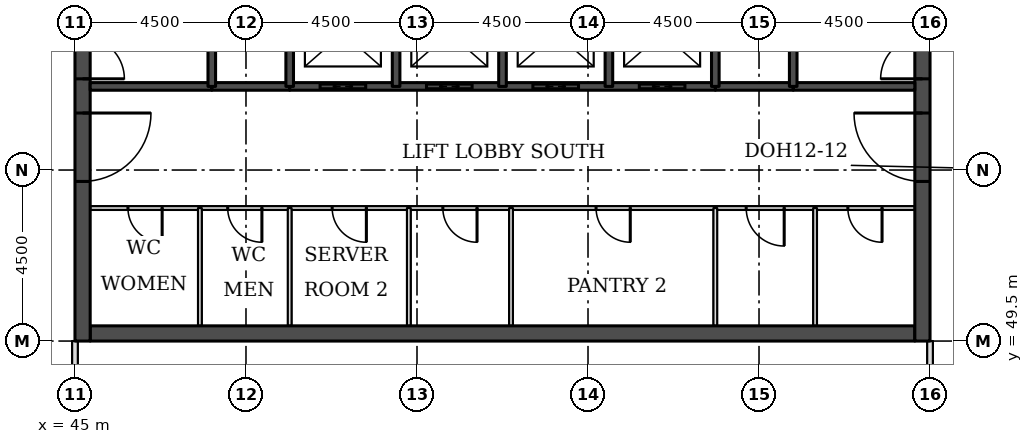
"""IFC4 building model, lengths in metres.
Left out: names, types, materials, properties, quantities, classifications, styles, units other than length and angle.
Written with IfcOpenShell. Run it as: python <this file> out.ifc"""

import sys

from ifc_helpers import new_model, si_unit, direction, frame, frame_2d, origin, place, context, subcontext, project, spatial, rectangle, extrude, element, fill, save


model = new_model("IFC4")
c1 = context("Model", 3, precision=1e-05, world=origin(), true_north=direction((0.0, 1.0)))
c2 = subcontext(c1, "Body", "Model", "MODEL_VIEW")
j1 = project(units=[si_unit("LENGTHUNIT", "METRE"), si_unit("PLANEANGLEUNIT", "RADIAN")], contexts=[c1])
p1 = place(None, origin())
s1 = spatial("IfcSite", under=j1, at=p1, CompositionType="ELEMENT")
p2 = place(p1, origin())
s2 = spatial("IfcBuilding", under=s1, at=p2, CompositionType="ELEMENT")
p3 = place(p2, frame((0.0, 0.0, 252.6)))
s3 = spatial("IfcBuildingStorey", under=s2, at=p3, CompositionType="ELEMENT", Elevation=252.6)
p4 = place(p3, frame((45.4, 49.7, 0.0), z_axis=(0.0, 0.0, 1.0), x_axis=(1.0, 0.0, 0.0)))
e1 = element("IfcWall", 1, at=p4, inside=s3, PredefinedType="SHEAR", context=c2, shape_type="SweptSolid", body=[
    extrude(rectangle(XDim=21.7, YDim=0.4, at=frame_2d((10.85, 0.0))), origin(), (0.0, 0.0, 1.0), 3.7),
])
p5 = place(p3, frame((45.2, 49.5, 0.0), z_axis=(0.0, 0.0, 1.0), x_axis=(0.0, 1.0, 0.0)))
e2 = element("IfcWall", 2, at=p5, inside=s3, PredefinedType="SHEAR", context=c2, shape_type="SweptSolid", body=[
    extrude(rectangle(XDim=22.5, YDim=0.4, at=frame_2d((11.25, 0.0))), origin(), (0.0, 0.0, 1.0), 3.7),
])
p6 = place(p5, frame((4.2, 0.0, 0.0)))
e3 = element("IfcOpeningElement", 3, at=p6, cuts=e2, PredefinedType="OPENING", context=c2, shape_type="SweptSolid", body=[
    extrude(rectangle(XDim=1.8, YDim=2.1, at=frame_2d((0.9, 1.05))), frame((0.0, 0.21, 0.0), z_axis=(0.0, -1.0, 0.0), x_axis=(1.0, 0.0, 0.0)), (0.0, 0.0, 1.0), 0.42),
])
p7 = place(p5, frame((6.9, 0.0, 0.0)))
e4 = element("IfcOpeningElement", 4, at=p7, cuts=e2, PredefinedType="OPENING", context=c2, shape_type="SweptSolid", body=[
    extrude(rectangle(XDim=1.1, YDim=2.1, at=frame_2d((0.55, 1.05))), frame((0.0, 0.21, 0.0), z_axis=(0.0, -1.0, 0.0), x_axis=(1.0, 0.0, 0.0)), (0.0, 0.0, 1.0), 0.42),
])
p8 = place(p5, frame((13.6, 0.0, 0.0)))
e5 = element("IfcOpeningElement", 5, at=p8, cuts=e2, PredefinedType="OPENING", context=c2, shape_type="SweptSolid", body=[
    extrude(rectangle(XDim=1.1, YDim=2.1, at=frame_2d((0.55, 1.05))), frame((0.0, 0.21, 0.0), z_axis=(0.0, -1.0, 0.0), x_axis=(1.0, 0.0, 0.0)), (0.0, 0.0, 1.0), 0.42),
])
p9 = place(p5, frame((16.5, 0.0, 0.0)))
e6 = element("IfcOpeningElement", 6, at=p9, cuts=e2, PredefinedType="OPENING", context=c2, shape_type="SweptSolid", body=[
    extrude(rectangle(XDim=1.8, YDim=2.1, at=frame_2d((0.9, 1.05))), frame((0.0, 0.21, 0.0), z_axis=(0.0, -1.0, 0.0), x_axis=(1.0, 0.0, 0.0)), (0.0, 0.0, 1.0), 0.42),
])
p10 = place(p3, frame((67.3, 49.5, 0.0), z_axis=(0.0, 0.0, 1.0), x_axis=(0.0, 1.0, 0.0)))
e7 = element("IfcWall", 7, at=p10, inside=s3, PredefinedType="SHEAR", context=c2, shape_type="SweptSolid", body=[
    extrude(rectangle(XDim=22.5, YDim=0.4, at=frame_2d((11.25, 0.0))), origin(), (0.0, 0.0, 1.0), 3.7),
])
p11 = place(p10, frame((4.2, 0.0, 0.0)))
e8 = element("IfcOpeningElement", 8, at=p11, cuts=e7, PredefinedType="OPENING", context=c2, shape_type="SweptSolid", body=[
    extrude(rectangle(XDim=1.8, YDim=2.1, at=frame_2d((0.9, 1.05))), frame((0.0, 0.21, 0.0), z_axis=(0.0, -1.0, 0.0), x_axis=(1.0, 0.0, 0.0)), (0.0, 0.0, 1.0), 0.42),
])
p12 = place(p10, frame((6.9, 0.0, 0.0)))
e9 = element("IfcOpeningElement", 9, at=p12, cuts=e7, PredefinedType="OPENING", context=c2, shape_type="SweptSolid", body=[
    extrude(rectangle(XDim=1.1, YDim=2.1, at=frame_2d((0.55, 1.05))), frame((0.0, 0.21, 0.0), z_axis=(0.0, -1.0, 0.0), x_axis=(1.0, 0.0, 0.0)), (0.0, 0.0, 1.0), 0.42),
])
p13 = place(p10, frame((13.6, 0.0, 0.0)))
e10 = element("IfcOpeningElement", 10, at=p13, cuts=e7, PredefinedType="OPENING", context=c2, shape_type="SweptSolid", body=[
    extrude(rectangle(XDim=1.1, YDim=2.1, at=frame_2d((0.55, 1.05))), frame((0.0, 0.21, 0.0), z_axis=(0.0, -1.0, 0.0), x_axis=(1.0, 0.0, 0.0)), (0.0, 0.0, 1.0), 0.42),
])
p14 = place(p10, frame((16.5, 0.0, 0.0)))
e11 = element("IfcOpeningElement", 11, at=p14, cuts=e7, PredefinedType="OPENING", context=c2, shape_type="SweptSolid", body=[
    extrude(rectangle(XDim=1.8, YDim=2.1, at=frame_2d((0.9, 1.05))), frame((0.0, 0.21, 0.0), z_axis=(0.0, -1.0, 0.0), x_axis=(1.0, 0.0, 0.0)), (0.0, 0.0, 1.0), 0.42),
])
p15 = place(p3, frame((67.5, 40.05, 0.0), z_axis=(0.0, 0.0, 1.0), x_axis=(0.0, 1.0, 0.0)))
e12 = element("IfcWall", 12, at=p15, inside=s3, PredefinedType="PARTITIONING", context=c2, shape_type="SweptSolid", body=[
    extrude(rectangle(XDim=9.45, YDim=0.15, at=frame_2d((4.725, 0.0))), origin(), (0.0, 0.0, 1.0), 3.022),
])
p16 = place(p3, frame((45.0, 48.0, 0.0), z_axis=(0.0, 0.0, 1.0), x_axis=(0.0, 1.0, 0.0)))
e13 = element("IfcWall", 13, at=p16, inside=s3, PredefinedType="PARTITIONING", context=c2, shape_type="SweptSolid", body=[
    extrude(rectangle(XDim=1.5, YDim=0.15, at=frame_2d((0.75, 0.0))), origin(), (0.0, 0.0, 1.0), 3.022),
])
p17 = place(p3, frame((45.4, 53.0, 0.0), z_axis=(0.0, 0.0, 1.0), x_axis=(1.0, 0.0, 0.0)))
e14 = element("IfcWall", 14, at=p17, inside=s3, PredefinedType="PARTITIONING", context=c2, shape_type="SweptSolid", body=[
    extrude(rectangle(XDim=21.7, YDim=0.1, at=frame_2d((10.85, 0.0))), origin(), (0.0, 0.0, 1.0), 3.55),
])
p18 = place(p17, frame((19.938, 0.0, 0.0)))
e15 = element("IfcOpeningElement", 15, at=p18, cuts=e14, PredefinedType="OPENING", context=c2, shape_type="SweptSolid", body=[
    extrude(rectangle(XDim=0.9, YDim=2.1, at=frame_2d((0.45, 1.05))), frame((0.0, 0.06, 0.0), z_axis=(0.0, -1.0, 0.0), x_axis=(1.0, 0.0, 0.0)), (0.0, 0.0, 1.0), 0.12),
])
p19 = place(p17, frame((17.262, 0.0, 0.0)))
e16 = element("IfcOpeningElement", 16, at=p19, cuts=e14, PredefinedType="OPENING", context=c2, shape_type="SweptSolid", body=[
    extrude(rectangle(XDim=1.0, YDim=2.1, at=frame_2d((0.5, 1.05))), frame((0.0, 0.06, 0.0), z_axis=(0.0, -1.0, 0.0), x_axis=(1.0, 0.0, 0.0)), (0.0, 0.0, 1.0), 0.12),
])
p20 = place(p17, frame((0.994, 0.0, 0.0)))
e17 = element("IfcOpeningElement", 17, at=p20, cuts=e14, PredefinedType="OPENING", context=c2, shape_type="SweptSolid", body=[
    extrude(rectangle(XDim=0.9, YDim=2.1, at=frame_2d((0.45, 1.05))), frame((0.0, 0.06, 0.0), z_axis=(0.0, -1.0, 0.0), x_axis=(1.0, 0.0, 0.0)), (0.0, 0.0, 1.0), 0.12),
])
p21 = place(p17, frame((3.619, 0.0, 0.0)))
e18 = element("IfcOpeningElement", 18, at=p21, cuts=e14, PredefinedType="OPENING", context=c2, shape_type="SweptSolid", body=[
    extrude(rectangle(XDim=0.9, YDim=2.1, at=frame_2d((0.45, 1.05))), frame((0.0, 0.06, 0.0), z_axis=(0.0, -1.0, 0.0), x_axis=(1.0, 0.0, 0.0)), (0.0, 0.0, 1.0), 0.12),
])
p22 = place(p17, frame((6.368, 0.0, 0.0)))
e19 = element("IfcOpeningElement", 19, at=p22, cuts=e14, PredefinedType="OPENING", context=c2, shape_type="SweptSolid", body=[
    extrude(rectangle(XDim=0.9, YDim=2.1, at=frame_2d((0.45, 1.05))), frame((0.0, 0.06, 0.0), z_axis=(0.0, -1.0, 0.0), x_axis=(1.0, 0.0, 0.0)), (0.0, 0.0, 1.0), 0.12),
])
p23 = place(p17, frame((9.28, 0.0, 0.0)))
e20 = element("IfcOpeningElement", 20, at=p23, cuts=e14, PredefinedType="OPENING", context=c2, shape_type="SweptSolid", body=[
    extrude(rectangle(XDim=0.9, YDim=2.1, at=frame_2d((0.45, 1.05))), frame((0.0, 0.06, 0.0), z_axis=(0.0, -1.0, 0.0), x_axis=(1.0, 0.0, 0.0)), (0.0, 0.0, 1.0), 0.12),
])
p24 = place(p17, frame((13.312, 0.0, 0.0)))
e21 = element("IfcOpeningElement", 21, at=p24, cuts=e14, PredefinedType="OPENING", context=c2, shape_type="SweptSolid", body=[
    extrude(rectangle(XDim=0.9, YDim=2.1, at=frame_2d((0.45, 1.05))), frame((0.0, 0.06, 0.0), z_axis=(0.0, -1.0, 0.0), x_axis=(1.0, 0.0, 0.0)), (0.0, 0.0, 1.0), 0.12),
])
for number, where, z_axis, x_axis in (
    (22, (48.6, 56.2, 0.0), (0.0, 0.0, 1.0), (1.0, 0.0, 0.0)),
    (23, (61.85, 56.2, 0.0), (0.0, 0.0, 1.0), (1.0, 0.0, 0.0)),
):
    element("IfcWall", number, at=place(p3, frame(where, z_axis=z_axis, x_axis=x_axis)), inside=s3, PredefinedType="SOLIDWALL", context=c2, shape_type="SweptSolid", body=[
        extrude(rectangle(XDim=2.05, YDim=0.2, at=frame_2d((1.025, 0.0))), origin(), (0.0, 0.0, 1.0), 3.55),
    ])
p25 = place(p3, frame((45.4, 56.2, 0.0), z_axis=(0.0, 0.0, 1.0), x_axis=(1.0, 0.0, 0.0)))
e24 = element("IfcWall", 24, at=p25, inside=s3, PredefinedType="SOLIDWALL", context=c2, shape_type="SweptSolid", body=[
    extrude(rectangle(XDim=3.2, YDim=0.2, at=frame_2d((1.6, 0.0))), origin(), (0.0, 0.0, 1.0), 3.55),
])
p26 = place(p3, frame((50.65, 56.2, 0.0), z_axis=(0.0, 0.0, 1.0), x_axis=(1.0, 0.0, 0.0)))
e25 = element("IfcWall", 25, at=p26, inside=s3, PredefinedType="SOLIDWALL", context=c2, shape_type="SweptSolid", body=[
    extrude(rectangle(XDim=11.2, YDim=0.2, at=frame_2d((5.6, 0.0))), origin(), (0.0, 0.0, 1.0), 3.55),
])
p27 = place(p26, frame((0.8, 0.0, 0.0)))
e26 = element("IfcOpeningElement", 26, at=p27, cuts=e25, PredefinedType="OPENING", context=c2, shape_type="SweptSolid", body=[
    extrude(rectangle(XDim=1.2, YDim=2.1, at=frame_2d((0.6, 1.05))), frame((0.0, 0.11, 0.0), z_axis=(0.0, -1.0, 0.0), x_axis=(1.0, 0.0, 0.0)), (0.0, 0.0, 1.0), 0.22),
])
p28 = place(p26, frame((3.6, 0.0, 0.0)))
e27 = element("IfcOpeningElement", 27, at=p28, cuts=e25, PredefinedType="OPENING", context=c2, shape_type="SweptSolid", body=[
    extrude(rectangle(XDim=1.2, YDim=2.1, at=frame_2d((0.6, 1.05))), frame((0.0, 0.11, 0.0), z_axis=(0.0, -1.0, 0.0), x_axis=(1.0, 0.0, 0.0)), (0.0, 0.0, 1.0), 0.22),
])
p29 = place(p26, frame((6.4, 0.0, 0.0)))
e28 = element("IfcOpeningElement", 28, at=p29, cuts=e25, PredefinedType="OPENING", context=c2, shape_type="SweptSolid", body=[
    extrude(rectangle(XDim=1.2, YDim=2.1, at=frame_2d((0.6, 1.05))), frame((0.0, 0.11, 0.0), z_axis=(0.0, -1.0, 0.0), x_axis=(1.0, 0.0, 0.0)), (0.0, 0.0, 1.0), 0.22),
])
p30 = place(p26, frame((9.2, 0.0, 0.0)))
e29 = element("IfcOpeningElement", 29, at=p30, cuts=e25, PredefinedType="OPENING", context=c2, shape_type="SweptSolid", body=[
    extrude(rectangle(XDim=1.2, YDim=2.1, at=frame_2d((0.6, 1.05))), frame((0.0, 0.11, 0.0), z_axis=(0.0, -1.0, 0.0), x_axis=(1.0, 0.0, 0.0)), (0.0, 0.0, 1.0), 0.22),
])
p31 = place(p3, frame((63.9, 56.2, 0.0), z_axis=(0.0, 0.0, 1.0), x_axis=(1.0, 0.0, 0.0)))
e30 = element("IfcWall", 30, at=p31, inside=s3, PredefinedType="SOLIDWALL", context=c2, shape_type="SweptSolid", body=[
    extrude(rectangle(XDim=3.2, YDim=0.2, at=frame_2d((1.6, 0.0))), origin(), (0.0, 0.0, 1.0), 3.55),
])
p32 = place(p3, frame((48.288, 49.9, 0.0), z_axis=(0.0, 0.0, 1.0), x_axis=(0.0, 1.0, 0.0)))
e31 = element("IfcWall", 31, at=p32, inside=s3, PredefinedType="PARTITIONING", context=c2, shape_type="SweptSolid", body=[
    extrude(rectangle(XDim=3.1, YDim=0.1, at=frame_2d((1.55, 0.0))), origin(), (0.0, 0.0, 1.0), 3.55),
])
p33 = place(p3, frame((48.6, 56.2, 0.0), z_axis=(0.0, 0.0, 1.0), x_axis=(0.0, 1.0, 0.0)))
e32 = element("IfcWall", 32, at=p33, inside=s3, PredefinedType="SOLIDWALL", context=c2, shape_type="SweptSolid", body=[
    extrude(rectangle(XDim=5.8, YDim=0.2, at=frame_2d((2.9, 0.0))), origin(), (0.0, 0.0, 1.0), 3.55),
])
p34 = place(p3, frame((50.65, 49.9, 0.0), z_axis=(0.0, 0.0, 1.0), x_axis=(0.0, 1.0, 0.0)))
e33 = element("IfcWall", 33, at=p34, inside=s3, PredefinedType="PARTITIONING", context=c2, shape_type="SweptSolid", body=[
    extrude(rectangle(XDim=3.1, YDim=0.1, at=frame_2d((1.55, 0.0))), origin(), (0.0, 0.0, 1.0), 3.55),
])
for number, where, z_axis, x_axis in (
    (34, (50.65, 56.2, 0.0), (0.0, 0.0, 1.0), (0.0, 1.0, 0.0)),
    (35, (53.45, 56.2, 0.0), (0.0, 0.0, 1.0), (0.0, 1.0, 0.0)),
):
    element("IfcWall", number, at=place(p3, frame(where, z_axis=z_axis, x_axis=x_axis)), inside=s3, PredefinedType="SOLIDWALL", context=c2, shape_type="SweptSolid", body=[
        extrude(rectangle(XDim=2.8, YDim=0.2, at=frame_2d((1.4, 0.0))), origin(), (0.0, 0.0, 1.0), 3.55),
    ])
p35 = place(p3, frame((53.786, 49.9, 0.0), z_axis=(0.0, 0.0, 1.0), x_axis=(0.0, 1.0, 0.0)))
e36 = element("IfcWall", 36, at=p35, inside=s3, PredefinedType="PARTITIONING", context=c2, shape_type="SweptSolid", body=[
    extrude(rectangle(XDim=3.1, YDim=0.1, at=frame_2d((1.55, 0.0))), origin(), (0.0, 0.0, 1.0), 3.55),
])
p36 = place(p3, frame((56.25, 56.2, 0.0), z_axis=(0.0, 0.0, 1.0), x_axis=(0.0, 1.0, 0.0)))
e37 = element("IfcWall", 37, at=p36, inside=s3, PredefinedType="SOLIDWALL", context=c2, shape_type="SweptSolid", body=[
    extrude(rectangle(XDim=2.8, YDim=0.2, at=frame_2d((1.4, 0.0))), origin(), (0.0, 0.0, 1.0), 3.55),
])
p37 = place(p3, frame((56.474, 49.9, 0.0), z_axis=(0.0, 0.0, 1.0), x_axis=(0.0, 1.0, 0.0)))
e38 = element("IfcWall", 38, at=p37, inside=s3, PredefinedType="PARTITIONING", context=c2, shape_type="SweptSolid", body=[
    extrude(rectangle(XDim=3.1, YDim=0.1, at=frame_2d((1.55, 0.0))), origin(), (0.0, 0.0, 1.0), 3.55),
])
p38 = place(p3, frame((59.05, 56.2, 0.0), z_axis=(0.0, 0.0, 1.0), x_axis=(0.0, 1.0, 0.0)))
e39 = element("IfcWall", 39, at=p38, inside=s3, PredefinedType="SOLIDWALL", context=c2, shape_type="SweptSolid", body=[
    extrude(rectangle(XDim=2.8, YDim=0.2, at=frame_2d((1.4, 0.0))), origin(), (0.0, 0.0, 1.0), 3.55),
])
p39 = place(p3, frame((61.85, 49.9, 0.0), z_axis=(0.0, 0.0, 1.0), x_axis=(0.0, 1.0, 0.0)))
e40 = element("IfcWall", 40, at=p39, inside=s3, PredefinedType="PARTITIONING", context=c2, shape_type="SweptSolid", body=[
    extrude(rectangle(XDim=3.1, YDim=0.1, at=frame_2d((1.55, 0.0))), origin(), (0.0, 0.0, 1.0), 3.55),
])
p40 = place(p3, frame((61.85, 56.2, 0.0), z_axis=(0.0, 0.0, 1.0), x_axis=(0.0, 1.0, 0.0)))
e41 = element("IfcWall", 41, at=p40, inside=s3, PredefinedType="SOLIDWALL", context=c2, shape_type="SweptSolid", body=[
    extrude(rectangle(XDim=2.8, YDim=0.2, at=frame_2d((1.4, 0.0))), origin(), (0.0, 0.0, 1.0), 3.55),
])
p41 = place(p3, frame((63.9, 56.2, 0.0), z_axis=(0.0, 0.0, 1.0), x_axis=(0.0, 1.0, 0.0)))
e42 = element("IfcWall", 42, at=p41, inside=s3, PredefinedType="SOLIDWALL", context=c2, shape_type="SweptSolid", body=[
    extrude(rectangle(XDim=5.8, YDim=0.2, at=frame_2d((2.9, 0.0))), origin(), (0.0, 0.0, 1.0), 3.55),
])
p42 = place(p3, frame((64.475, 49.9, 0.0), z_axis=(0.0, 0.0, 1.0), x_axis=(0.0, 1.0, 0.0)))
e43 = element("IfcWall", 43, at=p42, inside=s3, PredefinedType="PARTITIONING", context=c2, shape_type="SweptSolid", body=[
    extrude(rectangle(XDim=3.1, YDim=0.1, at=frame_2d((1.55, 0.0))), origin(), (0.0, 0.0, 1.0), 3.55),
])
p43 = place(p27, origin())
e44 = element("IfcDoor", 44, at=p43, inside=s3, OperationType="DOUBLE_DOOR_SLIDING", PredefinedType="DOOR", context=c2, shape_type="SweptSolid", body=[
    extrude(rectangle(XDim=1.2, YDim=2.1, at=frame_2d((0.6, 1.05))), frame((0.0, 0.025, 0.0), z_axis=(0.0, -1.0, 0.0), x_axis=(1.0, 0.0, 0.0)), (0.0, 0.0, 1.0), 0.05),
])
fill(e26, e44)
p44 = place(p28, origin())
e45 = element("IfcDoor", 45, at=p44, inside=s3, OperationType="DOUBLE_DOOR_SLIDING", PredefinedType="DOOR", context=c2, shape_type="SweptSolid", body=[
    extrude(rectangle(XDim=1.2, YDim=2.1, at=frame_2d((0.6, 1.05))), frame((0.0, 0.025, 0.0), z_axis=(0.0, -1.0, 0.0), x_axis=(1.0, 0.0, 0.0)), (0.0, 0.0, 1.0), 0.05),
])
fill(e27, e45)
p45 = place(p29, origin())
e46 = element("IfcDoor", 46, at=p45, inside=s3, OperationType="DOUBLE_DOOR_SLIDING", PredefinedType="DOOR", context=c2, shape_type="SweptSolid", body=[
    extrude(rectangle(XDim=1.2, YDim=2.1, at=frame_2d((0.6, 1.05))), frame((0.0, 0.025, 0.0), z_axis=(0.0, -1.0, 0.0), x_axis=(1.0, 0.0, 0.0)), (0.0, 0.0, 1.0), 0.05),
])
fill(e28, e46)
p46 = place(p30, origin())
e47 = element("IfcDoor", 47, at=p46, inside=s3, OperationType="DOUBLE_DOOR_SLIDING", PredefinedType="DOOR", context=c2, shape_type="SweptSolid", body=[
    extrude(rectangle(XDim=1.2, YDim=2.1, at=frame_2d((0.6, 1.05))), frame((0.0, 0.025, 0.0), z_axis=(0.0, -1.0, 0.0), x_axis=(1.0, 0.0, 0.0)), (0.0, 0.0, 1.0), 0.05),
])
fill(e29, e47)
p47 = place(p6, frame((1.8, 0.0, 0.0), z_axis=(0.0, 0.0, 1.0), x_axis=(-1.0, 0.0, 0.0)))
e48 = element("IfcDoor", 48, at=p47, inside=s3, OperationType="SINGLE_SWING_LEFT", PredefinedType="DOOR", context=c2, shape_type="SweptSolid", body=[
    extrude(rectangle(XDim=1.8, YDim=2.1, at=frame_2d((0.9, 1.05))), frame((0.0, 0.025, 0.0), z_axis=(0.0, -1.0, 0.0), x_axis=(1.0, 0.0, 0.0)), (0.0, 0.0, 1.0), 0.05),
])
fill(e3, e48)
p48 = place(p7, frame((1.1, 0.0, 0.0), z_axis=(0.0, 0.0, 1.0), x_axis=(-1.0, 0.0, 0.0)))
e49 = element("IfcDoor", 49, at=p48, inside=s3, OperationType="SINGLE_SWING_RIGHT", PredefinedType="DOOR", context=c2, shape_type="SweptSolid", body=[
    extrude(rectangle(XDim=1.1, YDim=2.1, at=frame_2d((0.55, 1.05))), frame((0.0, 0.025, 0.0), z_axis=(0.0, -1.0, 0.0), x_axis=(1.0, 0.0, 0.0)), (0.0, 0.0, 1.0), 0.05),
])
fill(e4, e49)
p49 = place(p11, origin())
e50 = element("IfcDoor", 50, at=p49, inside=s3, OperationType="SINGLE_SWING_RIGHT", PredefinedType="DOOR", context=c2, shape_type="SweptSolid", body=[
    extrude(rectangle(XDim=1.8, YDim=2.1, at=frame_2d((0.9, 1.05))), frame((0.0, 0.025, 0.0), z_axis=(0.0, -1.0, 0.0), x_axis=(1.0, 0.0, 0.0)), (0.0, 0.0, 1.0), 0.05),
])
fill(e8, e50)
p50 = place(p12, origin())
e51 = element("IfcDoor", 51, at=p50, inside=s3, OperationType="SINGLE_SWING_LEFT", PredefinedType="DOOR", context=c2, shape_type="SweptSolid", body=[
    extrude(rectangle(XDim=1.1, YDim=2.1, at=frame_2d((0.55, 1.05))), frame((0.0, 0.025, 0.0), z_axis=(0.0, -1.0, 0.0), x_axis=(1.0, 0.0, 0.0)), (0.0, 0.0, 1.0), 0.05),
])
fill(e9, e51)
p51 = place(p18, frame((0.9, 0.0, 0.0), z_axis=(0.0, 0.0, 1.0), x_axis=(-1.0, 0.0, 0.0)))
e52 = element("IfcDoor", 52, at=p51, inside=s3, OperationType="SINGLE_SWING_LEFT", PredefinedType="DOOR", context=c2, shape_type="SweptSolid", body=[
    extrude(rectangle(XDim=0.9, YDim=2.1, at=frame_2d((0.45, 1.05))), frame((0.0, 0.025, 0.0), z_axis=(0.0, -1.0, 0.0), x_axis=(1.0, 0.0, 0.0)), (0.0, 0.0, 1.0), 0.05),
])
fill(e15, e52)
p52 = place(p19, frame((1.0, 0.0, 0.0), z_axis=(0.0, 0.0, 1.0), x_axis=(-1.0, 0.0, 0.0)))
e53 = element("IfcDoor", 53, at=p52, inside=s3, OperationType="SINGLE_SWING_LEFT", PredefinedType="DOOR", context=c2, shape_type="SweptSolid", body=[
    extrude(rectangle(XDim=1.0, YDim=2.1, at=frame_2d((0.5, 1.05))), frame((0.0, 0.025, 0.0), z_axis=(0.0, -1.0, 0.0), x_axis=(1.0, 0.0, 0.0)), (0.0, 0.0, 1.0), 0.05),
])
fill(e16, e53)
p53 = place(p20, frame((0.9, 0.0, 0.0), z_axis=(0.0, 0.0, 1.0), x_axis=(-1.0, 0.0, 0.0)))
e54 = element("IfcDoor", 54, at=p53, inside=s3, OperationType="SINGLE_SWING_LEFT", PredefinedType="DOOR", context=c2, shape_type="SweptSolid", body=[
    extrude(rectangle(XDim=0.9, YDim=2.1, at=frame_2d((0.45, 1.05))), frame((0.0, 0.025, 0.0), z_axis=(0.0, -1.0, 0.0), x_axis=(1.0, 0.0, 0.0)), (0.0, 0.0, 1.0), 0.05),
])
fill(e17, e54)
p54 = place(p21, frame((0.9, 0.0, 0.0), z_axis=(0.0, 0.0, 1.0), x_axis=(-1.0, 0.0, 0.0)))
e55 = element("IfcDoor", 55, at=p54, inside=s3, OperationType="SINGLE_SWING_LEFT", PredefinedType="DOOR", context=c2, shape_type="SweptSolid", body=[
    extrude(rectangle(XDim=0.9, YDim=2.1, at=frame_2d((0.45, 1.05))), frame((0.0, 0.025, 0.0), z_axis=(0.0, -1.0, 0.0), x_axis=(1.0, 0.0, 0.0)), (0.0, 0.0, 1.0), 0.05),
])
fill(e18, e55)
p55 = place(p22, frame((0.9, 0.0, 0.0), z_axis=(0.0, 0.0, 1.0), x_axis=(-1.0, 0.0, 0.0)))
e56 = element("IfcDoor", 56, at=p55, inside=s3, OperationType="SINGLE_SWING_LEFT", PredefinedType="DOOR", context=c2, shape_type="SweptSolid", body=[
    extrude(rectangle(XDim=0.9, YDim=2.1, at=frame_2d((0.45, 1.05))), frame((0.0, 0.025, 0.0), z_axis=(0.0, -1.0, 0.0), x_axis=(1.0, 0.0, 0.0)), (0.0, 0.0, 1.0), 0.05),
])
fill(e19, e56)
p56 = place(p23, frame((0.9, 0.0, 0.0), z_axis=(0.0, 0.0, 1.0), x_axis=(-1.0, 0.0, 0.0)))
e57 = element("IfcDoor", 57, at=p56, inside=s3, OperationType="SINGLE_SWING_LEFT", PredefinedType="DOOR", context=c2, shape_type="SweptSolid", body=[
    extrude(rectangle(XDim=0.9, YDim=2.1, at=frame_2d((0.45, 1.05))), frame((0.0, 0.025, 0.0), z_axis=(0.0, -1.0, 0.0), x_axis=(1.0, 0.0, 0.0)), (0.0, 0.0, 1.0), 0.05),
])
fill(e20, e57)
p57 = place(p24, frame((0.9, 0.0, 0.0), z_axis=(0.0, 0.0, 1.0), x_axis=(-1.0, 0.0, 0.0)))
e58 = element("IfcDoor", 58, at=p57, inside=s3, OperationType="SINGLE_SWING_LEFT", PredefinedType="DOOR", context=c2, shape_type="SweptSolid", body=[
    extrude(rectangle(XDim=0.9, YDim=2.1, at=frame_2d((0.45, 1.05))), frame((0.0, 0.025, 0.0), z_axis=(0.0, -1.0, 0.0), x_axis=(1.0, 0.0, 0.0)), (0.0, 0.0, 1.0), 0.05),
])
fill(e21, e58)
save(model, sys.argv[1])
